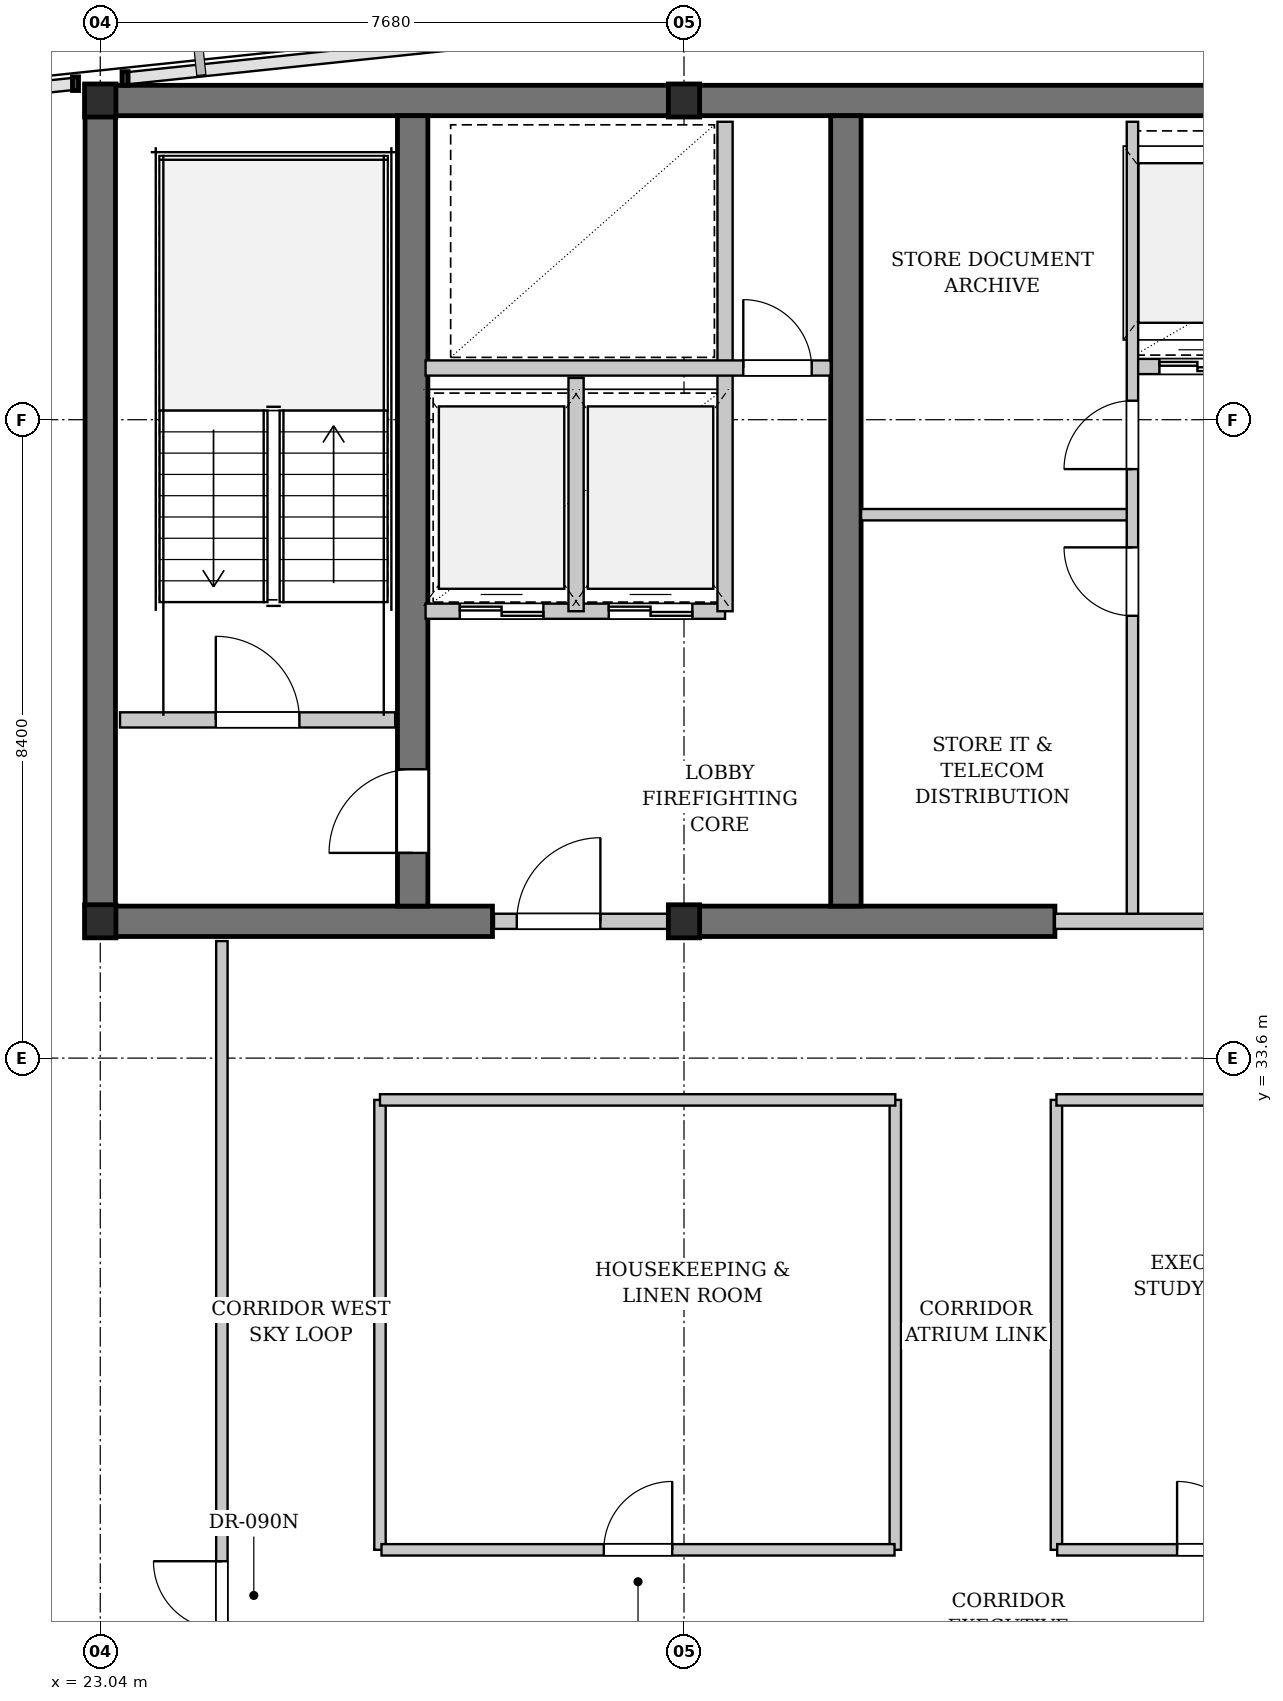
"""IFC4 building model, lengths in metres.
Left out: names, types, materials, properties, quantities, classifications, styles, units other than length and angle.
Written with IfcOpenShell. Run it as: python <this file> out.ifc"""

import sys

from ifc_helpers import new_model, si_unit, direction, frame, frame_2d, origin, origin_2d, place, context, subcontext, project, spatial, rectangle, i_section, extrude, element, fill, save


model = new_model("IFC4")
c1 = context("Model", 3, precision=1e-05, world=origin(), true_north=direction((0.0, 1.0)))
c2 = subcontext(c1, "Body", "Model", "MODEL_VIEW")
j1 = project(units=[si_unit("LENGTHUNIT", "METRE"), si_unit("PLANEANGLEUNIT", "RADIAN")], contexts=[c1])
p1 = place(None, origin())
s1 = spatial("IfcSite", under=j1, at=p1, CompositionType="ELEMENT")
p2 = place(p1, origin())
s2 = spatial("IfcBuilding", under=s1, at=p2, CompositionType="ELEMENT")
p3 = place(p2, frame((0.0, 0.0, 237.5)))
s3 = spatial("IfcBuildingStorey", under=s2, at=p3, CompositionType="ELEMENT", Elevation=237.5)
p4 = place(p3, frame((22.84, 46.2, 0.0), z_axis=(0.0, 0.0, 1.0), x_axis=(1.0, 0.0, 0.0)))
e1 = element("IfcWall", 1, at=p4, inside=s3, PredefinedType="SHEAR", context=c2, shape_type="SweptSolid", body=[
    extrude(rectangle(XDim=31.12, YDim=0.4, at=frame_2d((15.56, 0.0))), origin(), (0.0, 0.0, 1.0), 3.08),
])
p5 = place(p3, frame((22.84, 35.4, 0.0), z_axis=(0.0, 0.0, 1.0), x_axis=(1.0, 0.0, 0.0)))
e2 = element("IfcWall", 2, at=p5, inside=s3, PredefinedType="SHEAR", context=c2, shape_type="SweptSolid", body=[
    extrude(rectangle(XDim=5.36, YDim=0.4, at=frame_2d((2.68, 0.0))), origin(), (0.0, 0.0, 1.0), 3.08),
])
p6 = place(p3, frame((30.72, 35.4, 0.0), z_axis=(0.0, 0.0, 1.0), x_axis=(1.0, 0.0, 0.0)))
e3 = element("IfcWall", 3, at=p6, inside=s3, PredefinedType="SHEAR", context=c2, shape_type="SweptSolid", body=[
    extrude(rectangle(XDim=4.88, YDim=0.4, at=frame_2d((2.44, 0.0))), origin(), (0.0, 0.0, 1.0), 3.08),
])
p7 = place(p3, frame((23.04, 35.6, 0.0), z_axis=(0.0, 0.0, 1.0), x_axis=(0.0, 1.0, 0.0)))
e4 = element("IfcWall", 4, at=p7, inside=s3, PredefinedType="SHEAR", context=c2, shape_type="SweptSolid", body=[
    extrude(rectangle(XDim=10.4, YDim=0.4, at=frame_2d((5.2, 0.0))), origin(), (0.0, 0.0, 1.0), 3.08),
])
p8 = place(p3, frame((27.15, 35.6, 0.0), z_axis=(0.0, 0.0, 1.0), x_axis=(0.0, 1.0, 0.0)))
e5 = element("IfcWall", 5, at=p8, inside=s3, PredefinedType="SHEAR", context=c2, shape_type="SweptSolid", body=[
    extrude(rectangle(XDim=10.4, YDim=0.4, at=frame_2d((5.2, 0.0))), origin(), (0.0, 0.0, 1.0), 3.08),
])
p9 = place(p8, frame((0.7, 0.0, 0.0)))
e6 = element("IfcOpeningElement", 6, at=p9, cuts=e5, PredefinedType="OPENING", context=c2, shape_type="SweptSolid", body=[
    extrude(rectangle(XDim=1.1, YDim=2.15, at=frame_2d((0.55, 1.075))), frame((0.0, 0.21, 0.0), z_axis=(0.0, -1.0, 0.0), x_axis=(1.0, 0.0, 0.0)), (0.0, 0.0, 1.0), 0.42),
])
p10 = place(p3, frame((32.85, 35.6, 0.0), z_axis=(0.0, 0.0, 1.0), x_axis=(0.0, 1.0, 0.0)))
e7 = element("IfcWall", 7, at=p10, inside=s3, PredefinedType="SHEAR", context=c2, shape_type="SweptSolid", body=[
    extrude(rectangle(XDim=10.4, YDim=0.4, at=frame_2d((5.2, 0.0))), origin(), (0.0, 0.0, 1.0), 3.08),
])
for number, where, z_axis, x_axis in (
    (8, (23.04, 35.4, 0.0), (0.0, 0.0, 1.0), (1.0, 0.0, 0.0)),
    (9, (23.04, 46.2, 0.0), (0.0, 0.0, 1.0), (1.0, 0.0, 0.0)),
    (10, (30.72, 35.4, 0.0), (0.0, 0.0, 1.0), (1.0, 0.0, 0.0)),
    (11, (30.72, 46.2, 0.0), (0.0, 0.0, 1.0), (1.0, 0.0, 0.0)),
):
    element("IfcColumn", number, at=place(p3, frame(where, z_axis=z_axis, x_axis=x_axis)), inside=s3, PredefinedType="COLUMN", context=c2, shape_type="SweptSolid", body=[
        extrude(i_section(OverallWidth=0.412, OverallDepth=0.435, WebThickness=0.036, FlangeThickness=0.058, FilletRadius=0.015, at=origin_2d()), origin(), (0.0, 0.0, 1.0), 3.3),
    ])
p11 = place(p3, frame((23.3, 38.05, 0.0), z_axis=(0.0, 0.0, 1.0), x_axis=(1.0, 0.0, 0.0)))
e12 = element("IfcWall", 12, at=p11, inside=s3, PredefinedType="PARTITIONING", context=c2, shape_type="SweptSolid", body=[
    extrude(rectangle(XDim=3.62, YDim=0.2, at=frame_2d((1.81, 0.0))), origin(), (0.0, 0.0, 1.0), 3.08),
])
p12 = place(p11, frame((1.26, 0.0, 0.0)))
e13 = element("IfcOpeningElement", 13, at=p12, cuts=e12, PredefinedType="OPENING", context=c2, shape_type="SweptSolid", body=[
    extrude(rectangle(XDim=1.1, YDim=2.15, at=frame_2d((0.55, 1.075))), frame((0.0, 0.11, 0.0), z_axis=(0.0, -1.0, 0.0), x_axis=(1.0, 0.0, 0.0)), (0.0, 0.0, 1.0), 0.22),
])
p13 = place(p3, frame((28.22, 35.4, 0.0), z_axis=(0.0, 0.0, 1.0), x_axis=(1.0, 0.0, 0.0)))
e14 = element("IfcWall", 14, at=p13, inside=s3, PredefinedType="PARTITIONING", context=c2, shape_type="SweptSolid", body=[
    extrude(rectangle(XDim=2.5, YDim=0.2, at=frame_2d((1.25, 0.0))), origin(), (0.0, 0.0, 1.0), 2.313),
])
p14 = place(p13, frame((0.3, 0.0, 0.0)))
e15 = element("IfcOpeningElement", 15, at=p14, cuts=e14, PredefinedType="OPENING", context=c2, shape_type="SweptSolid", body=[
    extrude(rectangle(XDim=1.1, YDim=2.15, at=frame_2d((0.55, 1.075))), frame((0.0, 0.11, 0.0), z_axis=(0.0, -1.0, 0.0), x_axis=(1.0, 0.0, 0.0)), (0.0, 0.0, 1.0), 0.22),
])
p15 = place(p3, frame((27.32, 39.48, 0.0), z_axis=(0.0, 0.0, 1.0), x_axis=(1.0, 0.0, 0.0)))
e16 = element("IfcWall", 16, at=p15, inside=s3, PredefinedType="PARTITIONING", context=c2, shape_type="SweptSolid", body=[
    extrude(rectangle(XDim=3.94, YDim=0.2, at=frame_2d((1.97, 0.0))), origin(), (0.0, 0.0, 1.0), 3.08),
])
p16 = place(p15, frame((0.45, 0.0, 0.0)))
e17 = element("IfcOpeningElement", 17, at=p16, cuts=e16, PredefinedType="OPENING", context=c2, shape_type="SweptSolid", body=[
    extrude(rectangle(XDim=1.1, YDim=2.2, at=frame_2d((0.55, 1.1))), frame((0.0, 0.11, 0.0), z_axis=(0.0, -1.0, 0.0), x_axis=(1.0, 0.0, 0.0)), (0.0, 0.0, 1.0), 0.22),
])
p17 = place(p15, frame((2.41, 0.0, 0.0)))
e18 = element("IfcOpeningElement", 18, at=p17, cuts=e16, PredefinedType="OPENING", context=c2, shape_type="SweptSolid", body=[
    extrude(rectangle(XDim=1.1, YDim=2.2, at=frame_2d((0.55, 1.1))), frame((0.0, 0.11, 0.0), z_axis=(0.0, -1.0, 0.0), x_axis=(1.0, 0.0, 0.0)), (0.0, 0.0, 1.0), 0.22),
])
p18 = place(p3, frame((29.3, 39.48, 0.0), z_axis=(0.0, 0.0, 1.0), x_axis=(0.0, 1.0, 0.0)))
e19 = element("IfcWall", 19, at=p18, inside=s3, PredefinedType="PARTITIONING", context=c2, shape_type="SweptSolid", body=[
    extrude(rectangle(XDim=3.07, YDim=0.2, at=frame_2d((1.535, 0.0))), origin(), (0.0, 0.0, 1.0), 3.08),
])
p19 = place(p3, frame((31.26, 39.48, 0.0), z_axis=(0.0, 0.0, 1.0), x_axis=(0.0, 1.0, 0.0)))
e20 = element("IfcWall", 20, at=p19, inside=s3, PredefinedType="PARTITIONING", context=c2, shape_type="SweptSolid", body=[
    extrude(rectangle(XDim=6.44, YDim=0.2, at=frame_2d((3.22, 0.0))), origin(), (0.0, 0.0, 1.0), 3.08),
])
p20 = place(p3, frame((27.32, 42.68, 0.0), z_axis=(0.0, 0.0, 1.0), x_axis=(1.0, 0.0, 0.0)))
e21 = element("IfcWall", 21, at=p20, inside=s3, PredefinedType="PARTITIONING", context=c2, shape_type="SweptSolid", body=[
    extrude(rectangle(XDim=5.33, YDim=0.2, at=frame_2d((2.665, 0.0))), origin(), (0.0, 0.0, 1.0), 3.08),
])
p21 = place(p20, frame((4.18, 0.0, 0.0)))
e22 = element("IfcOpeningElement", 22, at=p21, cuts=e21, PredefinedType="OPENING", context=c2, shape_type="SweptSolid", body=[
    extrude(rectangle(XDim=0.9, YDim=2.15, at=frame_2d((0.45, 1.075))), frame((0.0, 0.11, 0.0), z_axis=(0.0, -1.0, 0.0), x_axis=(1.0, 0.0, 0.0)), (0.0, 0.0, 1.0), 0.22),
])
p22 = place(p3, frame((35.6, 35.4, 0.0), z_axis=(0.0, 0.0, 1.0), x_axis=(1.0, 0.0, 0.0)))
e23 = element("IfcWall", 23, at=p22, inside=s3, PredefinedType="PARTITIONING", context=c2, shape_type="SweptSolid", body=[
    extrude(rectangle(XDim=6.5, YDim=0.2, at=frame_2d((3.25, 0.0))), origin(), (0.0, 0.0, 1.0), 2.313),
])
p23 = place(p22, frame((3.8, 0.0, 0.0)))
e24 = element("IfcOpeningElement", 24, at=p23, cuts=e23, PredefinedType="OPENING", context=c2, shape_type="SweptSolid", body=[
    extrude(rectangle(XDim=1.8, YDim=2.3, at=frame_2d((0.9, 1.15))), frame((0.0, 0.11, 0.0), z_axis=(0.0, -1.0, 0.0), x_axis=(1.0, 0.0, 0.0)), (0.0, 0.0, 1.0), 0.22),
])
p24 = place(p3, frame((36.6, 42.7, 0.0), z_axis=(0.0, 0.0, 1.0), x_axis=(1.0, 0.0, 0.0)))
e25 = element("IfcWall", 25, at=p24, inside=s3, PredefinedType="PARTITIONING", context=c2, shape_type="SweptSolid", body=[
    extrude(rectangle(XDim=5.25, YDim=0.2, at=frame_2d((2.625, 0.0))), origin(), (0.0, 0.0, 1.0), 3.08),
])
p25 = place(p24, frame((0.375, 0.0, 0.0)))
e26 = element("IfcOpeningElement", 26, at=p25, cuts=e25, PredefinedType="OPENING", context=c2, shape_type="SweptSolid", body=[
    extrude(rectangle(XDim=1.0, YDim=2.2, at=frame_2d((0.5, 1.1))), frame((0.0, 0.11, 0.0), z_axis=(0.0, -1.0, 0.0), x_axis=(1.0, 0.0, 0.0)), (0.0, 0.0, 1.0), 0.22),
])
p26 = place(p24, frame((2.125, 0.0, 0.0)))
e27 = element("IfcOpeningElement", 27, at=p26, cuts=e25, PredefinedType="OPENING", context=c2, shape_type="SweptSolid", body=[
    extrude(rectangle(XDim=1.0, YDim=2.2, at=frame_2d((0.5, 1.1))), frame((0.0, 0.11, 0.0), z_axis=(0.0, -1.0, 0.0), x_axis=(1.0, 0.0, 0.0)), (0.0, 0.0, 1.0), 0.22),
])
p27 = place(p24, frame((3.875, 0.0, 0.0)))
e28 = element("IfcOpeningElement", 28, at=p27, cuts=e25, PredefinedType="OPENING", context=c2, shape_type="SweptSolid", body=[
    extrude(rectangle(XDim=1.0, YDim=2.2, at=frame_2d((0.5, 1.1))), frame((0.0, 0.11, 0.0), z_axis=(0.0, -1.0, 0.0), x_axis=(1.0, 0.0, 0.0)), (0.0, 0.0, 1.0), 0.22),
])
p28 = place(p3, frame((33.05, 40.75, 0.0), z_axis=(0.0, 0.0, 1.0), x_axis=(1.0, 0.0, 0.0)))
e29 = element("IfcWall", 29, at=p28, inside=s3, PredefinedType="PARTITIONING", context=c2, shape_type="SweptSolid", body=[
    extrude(rectangle(XDim=3.57, YDim=0.15, at=frame_2d((1.785, 0.0))), origin(), (0.0, 0.0, 1.0), 3.08),
])
p29 = place(p3, frame((36.62, 35.5, 0.0), z_axis=(0.0, 0.0, 1.0), x_axis=(0.0, 1.0, 0.0)))
e30 = element("IfcWall", 30, at=p29, inside=s3, PredefinedType="PARTITIONING", context=c2, shape_type="SweptSolid", body=[
    extrude(rectangle(XDim=10.42, YDim=0.15, at=frame_2d((5.21, 0.0))), origin(), (0.0, 0.0, 1.0), 3.08),
])
p30 = place(p29, frame((3.92, 0.0, 0.0)))
e31 = element("IfcOpeningElement", 31, at=p30, cuts=e30, PredefinedType="OPENING", context=c2, shape_type="SweptSolid", body=[
    extrude(rectangle(XDim=0.9, YDim=2.15, at=frame_2d((0.45, 1.075))), frame((0.0, 0.085, 0.0), z_axis=(0.0, -1.0, 0.0), x_axis=(1.0, 0.0, 0.0)), (0.0, 0.0, 1.0), 0.17),
])
p31 = place(p29, frame((5.85, 0.0, 0.0)))
e32 = element("IfcOpeningElement", 32, at=p31, cuts=e30, PredefinedType="OPENING", context=c2, shape_type="SweptSolid", body=[
    extrude(rectangle(XDim=0.9, YDim=2.15, at=frame_2d((0.45, 1.075))), frame((0.0, 0.085, 0.0), z_axis=(0.0, -1.0, 0.0), x_axis=(1.0, 0.0, 0.0)), (0.0, 0.0, 1.0), 0.17),
])
p32 = place(p3, frame((24.64, 25.05, 0.0), z_axis=(0.0, 0.0, 1.0), x_axis=(0.0, 1.0, 0.0)))
e33 = element("IfcWall", 33, at=p32, inside=s3, PredefinedType="PARTITIONING", context=c2, shape_type="SweptSolid", body=[
    extrude(rectangle(XDim=10.09, YDim=0.15, at=frame_2d((5.045, 0.0))), origin(), (0.0, 0.0, 1.0), 3.08),
])
p33 = place(p32, frame((1.03, 0.0, 0.0)))
e34 = element("IfcOpeningElement", 34, at=p33, cuts=e33, PredefinedType="OPENING", context=c2, shape_type="SweptSolid", body=[
    extrude(rectangle(XDim=0.9, YDim=2.15, at=frame_2d((0.45, 1.075))), frame((0.0, 0.085, 0.0), z_axis=(0.0, -1.0, 0.0), x_axis=(1.0, 0.0, 0.0)), (0.0, 0.0, 1.0), 0.17),
])
for number, where, z_axis, x_axis in (
    (35, (26.72, 27.13, 0.0), (0.0, 0.0, 1.0), (0.0, 1.0, 0.0)),
    (36, (33.5, 27.13, 0.0), (0.0, 0.0, 1.0), (0.0, 1.0, 0.0)),
    (37, (35.62, 27.13, 0.0), (0.0, 0.0, 1.0), (0.0, 1.0, 0.0)),
):
    element("IfcWall", number, at=place(p3, frame(where, z_axis=z_axis, x_axis=x_axis)), inside=s3, PredefinedType="PARTITIONING", context=c2, shape_type="SweptSolid", body=[
        extrude(rectangle(XDim=5.92, YDim=0.15, at=frame_2d((2.96, 0.0))), origin(), (0.0, 0.0, 1.0), 3.08),
    ])
p34 = place(p3, frame((26.72, 33.05, 0.0), z_axis=(0.0, 0.0, 1.0), x_axis=(1.0, 0.0, 0.0)))
e38 = element("IfcWall", 38, at=p34, inside=s3, PredefinedType="PARTITIONING", context=c2, shape_type="SweptSolid", body=[
    extrude(rectangle(XDim=6.78, YDim=0.15, at=frame_2d((3.39, 0.0))), origin(), (0.0, 0.0, 1.0), 3.08),
])
p35 = place(p3, frame((35.62, 33.05, 0.0), z_axis=(0.0, 0.0, 1.0), x_axis=(1.0, 0.0, 0.0)))
e39 = element("IfcWall", 39, at=p35, inside=s3, PredefinedType="PARTITIONING", context=c2, shape_type="SweptSolid", body=[
    extrude(rectangle(XDim=17.66, YDim=0.15, at=frame_2d((8.83, 0.0))), origin(), (0.0, 0.0, 1.0), 3.08),
])
p36 = place(p3, frame((26.74, 27.13, 0.0), z_axis=(0.0, 0.0, 1.0), x_axis=(1.0, 0.0, 0.0)))
e40 = element("IfcWall", 40, at=p36, inside=s3, PredefinedType="PARTITIONING", context=c2, shape_type="SweptSolid", body=[
    extrude(rectangle(XDim=6.75, YDim=0.15, at=frame_2d((3.375, 0.0))), origin(), (0.0, 0.0, 1.0), 3.08),
])
p37 = place(p36, frame((2.925, 0.0, 0.0)))
e41 = element("IfcOpeningElement", 41, at=p37, cuts=e40, PredefinedType="OPENING", context=c2, shape_type="SweptSolid", body=[
    extrude(rectangle(XDim=0.9, YDim=2.15, at=frame_2d((0.45, 1.075))), frame((0.0, 0.085, 0.0), z_axis=(0.0, -1.0, 0.0), x_axis=(1.0, 0.0, 0.0)), (0.0, 0.0, 1.0), 0.17),
])
p38 = place(p3, frame((35.63, 27.13, 0.0), z_axis=(0.0, 0.0, 1.0), x_axis=(1.0, 0.0, 0.0)))
e42 = element("IfcWall", 42, at=p38, inside=s3, PredefinedType="PARTITIONING", context=c2, shape_type="SweptSolid", body=[
    extrude(rectangle(XDim=17.63, YDim=0.15, at=frame_2d((8.815, 0.0))), origin(), (0.0, 0.0, 1.0), 3.08),
])
p39 = place(p38, frame((1.577, 0.0, 0.0)))
e43 = element("IfcOpeningElement", 43, at=p39, cuts=e42, PredefinedType="OPENING", context=c2, shape_type="SweptSolid", body=[
    extrude(rectangle(XDim=0.9, YDim=2.15, at=frame_2d((0.45, 1.075))), frame((0.0, 0.085, 0.0), z_axis=(0.0, -1.0, 0.0), x_axis=(1.0, 0.0, 0.0)), (0.0, 0.0, 1.0), 0.17),
])
p40 = place(p38, frame((6.779, 0.0, 0.0)))
e44 = element("IfcOpeningElement", 44, at=p40, cuts=e42, PredefinedType="OPENING", context=c2, shape_type="SweptSolid", body=[
    extrude(rectangle(XDim=0.9, YDim=2.15, at=frame_2d((0.45, 1.075))), frame((0.0, 0.085, 0.0), z_axis=(0.0, -1.0, 0.0), x_axis=(1.0, 0.0, 0.0)), (0.0, 0.0, 1.0), 0.17),
])
p41 = place(p38, frame((13.566, 0.0, 0.0)))
e45 = element("IfcOpeningElement", 45, at=p41, cuts=e42, PredefinedType="OPENING", context=c2, shape_type="SweptSolid", body=[
    extrude(rectangle(XDim=0.9, YDim=2.15, at=frame_2d((0.45, 1.075))), frame((0.0, 0.085, 0.0), z_axis=(0.0, -1.0, 0.0), x_axis=(1.0, 0.0, 0.0)), (0.0, 0.0, 1.0), 0.17),
])
p42 = place(p12, origin())
e46 = element("IfcDoor", 46, at=p42, inside=s3, OperationType="SINGLE_SWING_LEFT", PredefinedType="DOOR", context=c2, shape_type="SweptSolid", body=[
    extrude(rectangle(XDim=1.1, YDim=2.15, at=frame_2d((0.55, 1.075))), frame((0.0, 0.025, 0.0), z_axis=(0.0, -1.0, 0.0), x_axis=(1.0, 0.0, 0.0)), (0.0, 0.0, 1.0), 0.05),
])
fill(e13, e46)
p43 = place(p14, origin())
e47 = element("IfcDoor", 47, at=p43, inside=s3, OperationType="SINGLE_SWING_RIGHT", PredefinedType="DOOR", context=c2, shape_type="SweptSolid", body=[
    extrude(rectangle(XDim=1.1, YDim=2.15, at=frame_2d((0.55, 1.075))), frame((0.0, 0.025, 0.0), z_axis=(0.0, -1.0, 0.0), x_axis=(1.0, 0.0, 0.0)), (0.0, 0.0, 1.0), 0.05),
])
fill(e15, e47)
p44 = place(p16, origin())
e48 = element("IfcDoor", 48, at=p44, inside=s3, OperationType="DOUBLE_DOOR_SLIDING", PredefinedType="DOOR", context=c2, shape_type="SweptSolid", body=[
    extrude(rectangle(XDim=1.1, YDim=2.2, at=frame_2d((0.55, 1.1))), frame((0.0, 0.025, 0.0), z_axis=(0.0, -1.0, 0.0), x_axis=(1.0, 0.0, 0.0)), (0.0, 0.0, 1.0), 0.05),
])
fill(e17, e48)
p45 = place(p17, origin())
e49 = element("IfcDoor", 49, at=p45, inside=s3, OperationType="DOUBLE_DOOR_SLIDING", PredefinedType="DOOR", context=c2, shape_type="SweptSolid", body=[
    extrude(rectangle(XDim=1.1, YDim=2.2, at=frame_2d((0.55, 1.1))), frame((0.0, 0.025, 0.0), z_axis=(0.0, -1.0, 0.0), x_axis=(1.0, 0.0, 0.0)), (0.0, 0.0, 1.0), 0.05),
])
fill(e18, e49)
p46 = place(p21, origin())
e50 = element("IfcDoor", 50, at=p46, inside=s3, OperationType="SINGLE_SWING_LEFT", PredefinedType="DOOR", context=c2, shape_type="SweptSolid", body=[
    extrude(rectangle(XDim=0.9, YDim=2.15, at=frame_2d((0.45, 1.075))), frame((0.0, 0.025, 0.0), z_axis=(0.0, -1.0, 0.0), x_axis=(1.0, 0.0, 0.0)), (0.0, 0.0, 1.0), 0.05),
])
fill(e22, e50)
p47 = place(p25, origin())
e51 = element("IfcDoor", 51, at=p47, inside=s3, OperationType="DOUBLE_DOOR_SLIDING", PredefinedType="DOOR", context=c2, shape_type="SweptSolid", body=[
    extrude(rectangle(XDim=1.0, YDim=2.2, at=frame_2d((0.5, 1.1))), frame((0.0, 0.025, 0.0), z_axis=(0.0, -1.0, 0.0), x_axis=(1.0, 0.0, 0.0)), (0.0, 0.0, 1.0), 0.05),
])
fill(e26, e51)
p48 = place(p30, origin())
e52 = element("IfcDoor", 52, at=p48, inside=s3, OperationType="SINGLE_SWING_RIGHT", PredefinedType="DOOR", context=c2, shape_type="SweptSolid", body=[
    extrude(rectangle(XDim=0.9, YDim=2.15, at=frame_2d((0.45, 1.075))), frame((0.0, 0.025, 0.0), z_axis=(0.0, -1.0, 0.0), x_axis=(1.0, 0.0, 0.0)), (0.0, 0.0, 1.0), 0.05),
])
fill(e31, e52)
p49 = place(p31, origin())
e53 = element("IfcDoor", 53, at=p49, inside=s3, OperationType="SINGLE_SWING_LEFT", PredefinedType="DOOR", context=c2, shape_type="SweptSolid", body=[
    extrude(rectangle(XDim=0.9, YDim=2.15, at=frame_2d((0.45, 1.075))), frame((0.0, 0.025, 0.0), z_axis=(0.0, -1.0, 0.0), x_axis=(1.0, 0.0, 0.0)), (0.0, 0.0, 1.0), 0.05),
])
fill(e32, e53)
p50 = place(p33, origin())
e54 = element("IfcDoor", 54, at=p50, inside=s3, OperationType="SINGLE_SWING_RIGHT", PredefinedType="DOOR", context=c2, shape_type="SweptSolid", body=[
    extrude(rectangle(XDim=0.9, YDim=2.15, at=frame_2d((0.45, 1.075))), frame((0.0, 0.025, 0.0), z_axis=(0.0, -1.0, 0.0), x_axis=(1.0, 0.0, 0.0)), (0.0, 0.0, 1.0), 0.05),
])
fill(e34, e54)
p51 = place(p37, origin())
e55 = element("IfcDoor", 55, at=p51, inside=s3, OperationType="SINGLE_SWING_RIGHT", PredefinedType="DOOR", context=c2, shape_type="SweptSolid", body=[
    extrude(rectangle(XDim=0.9, YDim=2.15, at=frame_2d((0.45, 1.075))), frame((0.0, 0.025, 0.0), z_axis=(0.0, -1.0, 0.0), x_axis=(1.0, 0.0, 0.0)), (0.0, 0.0, 1.0), 0.05),
])
fill(e41, e55)
p52 = place(p39, origin())
e56 = element("IfcDoor", 56, at=p52, inside=s3, OperationType="SINGLE_SWING_LEFT", PredefinedType="DOOR", context=c2, shape_type="SweptSolid", body=[
    extrude(rectangle(XDim=0.9, YDim=2.15, at=frame_2d((0.45, 1.075))), frame((0.0, 0.025, 0.0), z_axis=(0.0, -1.0, 0.0), x_axis=(1.0, 0.0, 0.0)), (0.0, 0.0, 1.0), 0.05),
])
fill(e43, e56)
p53 = place(p9, origin())
e57 = element("IfcDoor", 57, at=p53, inside=s3, OperationType="SINGLE_SWING_LEFT", PredefinedType="DOOR", context=c2, shape_type="SweptSolid", body=[
    extrude(rectangle(XDim=1.1, YDim=2.15, at=frame_2d((0.55, 1.075))), frame((0.0, 0.025, 0.0), z_axis=(0.0, -1.0, 0.0), x_axis=(1.0, 0.0, 0.0)), (0.0, 0.0, 1.0), 0.05),
])
fill(e6, e57)
save(model, sys.argv[1])
